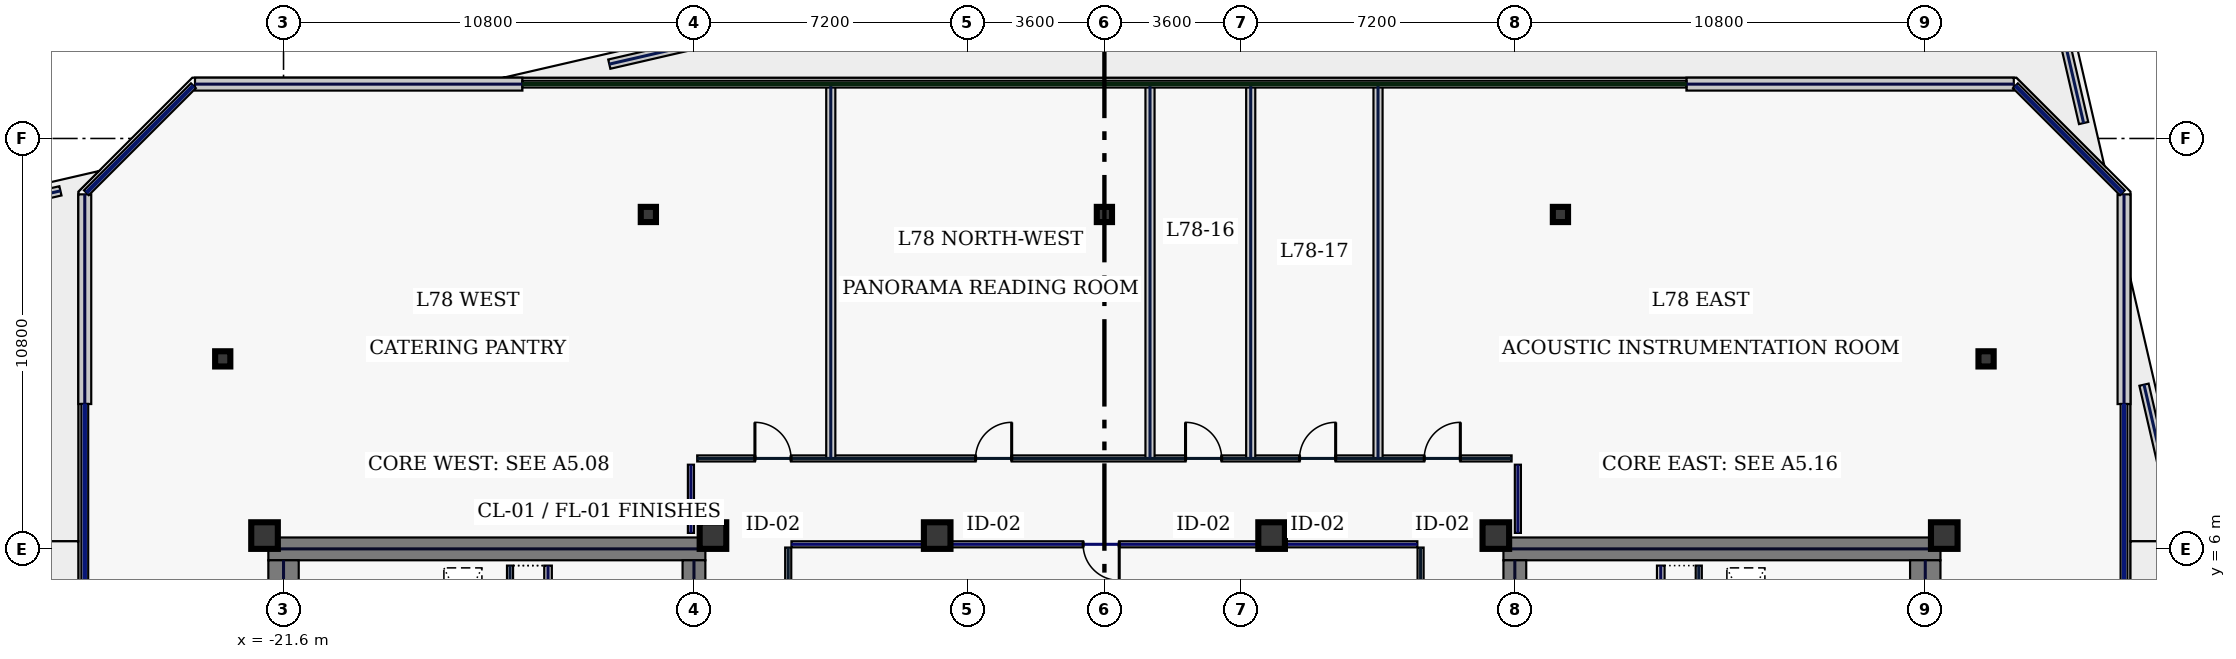
"""IFC4 building model, lengths in metres.
Left out: names, types, materials, properties, quantities, classifications, styles, units other than length and angle.
Written with IfcOpenShell. Run it as: python <this file> out.ifc"""

import sys

from ifc_helpers import new_model, si_unit, direction, frame, frame_2d, origin, origin_2d, place, context, subcontext, project, spatial, rectangle, hollow_rectangle, extrude, element, fill, save


model = new_model("IFC4")
c1 = context("Model", 3, precision=1e-05, world=origin(), true_north=direction((0.0, 1.0)))
c2 = subcontext(c1, "Body", "Model", "MODEL_VIEW")
j1 = project(units=[si_unit("LENGTHUNIT", "METRE"), si_unit("PLANEANGLEUNIT", "RADIAN")], contexts=[c1])
p1 = place(None, origin())
s1 = spatial("IfcSite", under=j1, at=p1, CompositionType="ELEMENT")
p2 = place(p1, origin())
s2 = spatial("IfcBuilding", under=s1, at=p2, CompositionType="ELEMENT")
p3 = place(p2, frame((0.0, 0.0, 333.0)))
s3 = spatial("IfcBuildingStorey", under=s2, at=p3, CompositionType="ELEMENT", Elevation=333.0)
p4 = place(p3, frame((-22.0, 6.0, 0.0), z_axis=(0.0, 0.0, 1.0), x_axis=(1.0, 0.0, 0.0)))
e1 = element("IfcWall", 1, at=p4, inside=s3, PredefinedType="SHEAR", context=c2, shape_type="SweptSolid", body=[
    extrude(rectangle(XDim=11.5, YDim=0.6, at=frame_2d((5.75, 0.0))), origin(), (0.0, 0.0, 1.0), 6.5),
])
p5 = place(p3, frame((-21.6, -5.7, 0.0), z_axis=(0.0, 0.0, 1.0), x_axis=(0.0, 1.0, 0.0)))
e2 = element("IfcWall", 2, at=p5, inside=s3, PredefinedType="SHEAR", context=c2, shape_type="SweptSolid", body=[
    extrude(rectangle(XDim=11.4, YDim=0.8, at=frame_2d((5.7, 0.0))), origin(), (0.0, 0.0, 1.0), 6.5),
])
p6 = place(p3, frame((-10.8, 0.05, 0.0), z_axis=(0.0, 0.0, 1.0), x_axis=(0.0, 1.0, 0.0)))
e3 = element("IfcWall", 3, at=p6, inside=s3, PredefinedType="SHEAR", context=c2, shape_type="SweptSolid", body=[
    extrude(rectangle(XDim=5.65, YDim=0.6, at=frame_2d((2.825, 0.0))), origin(), (0.0, 0.0, 1.0), 6.5),
])
p7 = place(p3, frame((10.5, 6.0, 0.0), z_axis=(0.0, 0.0, 1.0), x_axis=(1.0, 0.0, 0.0)))
e4 = element("IfcWall", 4, at=p7, inside=s3, PredefinedType="SHEAR", context=c2, shape_type="SweptSolid", body=[
    extrude(rectangle(XDim=11.5, YDim=0.6, at=frame_2d((5.75, 0.0))), origin(), (0.0, 0.0, 1.0), 6.5),
])
p8 = place(p3, frame((21.6, -5.7, 0.0), z_axis=(0.0, 0.0, 1.0), x_axis=(0.0, 1.0, 0.0)))
e5 = element("IfcWall", 5, at=p8, inside=s3, PredefinedType="SHEAR", context=c2, shape_type="SweptSolid", body=[
    extrude(rectangle(XDim=11.4, YDim=0.8, at=frame_2d((5.7, 0.0))), origin(), (0.0, 0.0, 1.0), 6.5),
])
p9 = place(p3, frame((10.8, 0.05, 0.0), z_axis=(0.0, 0.0, 1.0), x_axis=(0.0, 1.0, 0.0)))
e6 = element("IfcWall", 6, at=p9, inside=s3, PredefinedType="SHEAR", context=c2, shape_type="SweptSolid", body=[
    extrude(rectangle(XDim=5.65, YDim=0.6, at=frame_2d((2.825, 0.0))), origin(), (0.0, 0.0, 1.0), 6.5),
])
for number, where, z_axis, x_axis in (
    (7, (-22.1, 6.35, 0.0), (0.0, 0.0, 1.0), (1.0, 0.0, 0.0)),
    (8, (-10.3, 6.35, 0.0), (0.0, 0.0, 1.0), (1.0, 0.0, 0.0)),
    (9, (10.3, 6.35, 0.0), (0.0, 0.0, 1.0), (1.0, 0.0, 0.0)),
    (10, (22.1, 6.35, 0.0), (0.0, 0.0, 1.0), (1.0, 0.0, 0.0)),
    (11, (-4.4, 6.35, 0.0), (0.0, 0.0, 1.0), (1.0, 0.0, 0.0)),
    (12, (4.4, 6.35, 0.0), (0.0, 0.0, 1.0), (1.0, 0.0, 0.0)),
):
    element("IfcColumn", number, at=place(p3, frame(where, z_axis=z_axis, x_axis=x_axis)), inside=s3, PredefinedType="COLUMN", context=c2, shape_type="SweptSolid", body=[
        extrude(hollow_rectangle(XDim=0.7, YDim=0.7, WallThickness=0.032, at=origin_2d()), origin(), (0.0, 0.0, 1.0), 6.5),
    ])
for number, where, z_axis, x_axis in (
    (13, (23.2, 11.0, 0.0), (0.0, 0.0, 1.0), (1.0, 0.0, 0.0)),
    (14, (-23.2, 11.0, 0.0), (0.0, 0.0, 1.0), (1.0, 0.0, 0.0)),
    (15, (-12.0, 14.8, 0.0), (0.0, 0.0, 1.0), (1.0, 0.0, 0.0)),
    (16, (0.0, 14.8, 0.0), (0.0, 0.0, 1.0), (1.0, 0.0, 0.0)),
    (17, (12.0, 14.8, 0.0), (0.0, 0.0, 1.0), (1.0, 0.0, 0.0)),
):
    element("IfcColumn", number, at=place(p3, frame(where, z_axis=z_axis, x_axis=x_axis)), inside=s3, PredefinedType="COLUMN", context=c2, shape_type="SweptSolid", body=[
        extrude(hollow_rectangle(XDim=0.4, YDim=0.4, WallThickness=0.02, at=origin_2d()), origin(), (0.0, 0.0, 1.0), 6.5),
    ])
p10 = place(p3, frame((-33.872, 13.944, 0.0), z_axis=(0.0, 0.0, 1.0), x_axis=(0.974368645226, 0.224957203043, 0.0)))
e18 = element("IfcWall", 18, at=p10, inside=s3, PredefinedType="PARAPET", context=c2, shape_type="SweptSolid", body=[
    extrude(rectangle(XDim=6.57, YDim=0.25, at=frame_2d((3.285, 0.0))), origin(), (0.0, 0.0, 1.0), 1.15),
])
p11 = place(p3, frame((-13.028, 18.756, 0.0), z_axis=(0.0, 0.0, 1.0), x_axis=(0.974370527604, 0.224949049647, 0.0)))
e19 = element("IfcWall", 19, at=p11, inside=s3, PredefinedType="PARAPET", context=c2, shape_type="SweptSolid", body=[
    extrude(rectangle(XDim=32.856, YDim=0.25, at=frame_2d((16.428, 0.0))), origin(), (0.0, 0.0, 1.0), 1.15),
])
p12 = place(p3, frame((24.498, 22.703, 0.0), z_axis=(0.0, 0.0, 1.0), x_axis=(0.224960650299, -0.974367849335, 0.0)))
e20 = element("IfcWall", 20, at=p12, inside=s3, PredefinedType="PARAPET", context=c2, shape_type="SweptSolid", body=[
    extrude(rectangle(XDim=5.641, YDim=0.25, at=frame_2d((2.821, 0.0))), origin(), (0.0, 0.0, 1.0), 1.15),
])
p13 = place(p3, frame((27.356, 10.321, 0.0), z_axis=(0.0, 0.0, 1.0), x_axis=(0.224955106174, -0.974369129338, 0.0)))
e21 = element("IfcWall", 21, at=p13, inside=s3, PredefinedType="PARAPET", context=c2, shape_type="SweptSolid", body=[
    extrude(rectangle(XDim=22.941, YDim=0.25, at=frame_2d((11.47, 0.0))), origin(), (0.0, 0.0, 1.0), 1.15),
])
p14 = place(p3, frame((-26.83, 9.811, 0.0), z_axis=(0.0, 0.0, 1.0), x_axis=(0.0, 1.0, 0.0)))
e22 = element("IfcWall", 22, at=p14, inside=s3, PredefinedType="STANDARD", context=c2, shape_type="SweptSolid", body=[
    extrude(rectangle(XDim=5.518, YDim=0.34, at=frame_2d((2.759, 0.0))), origin(), (0.0, 0.0, 1.0), 6.5),
])
p15 = place(p3, frame((-23.93, 18.23, 0.0), z_axis=(0.0, 0.0, 1.0), x_axis=(1.0, 0.0, 0.0)))
e23 = element("IfcWall", 23, at=p15, inside=s3, PredefinedType="STANDARD", context=c2, shape_type="SweptSolid", body=[
    extrude(rectangle(XDim=8.615, YDim=0.34, at=frame_2d((4.308, 0.0))), origin(), (0.0, 0.0, 1.0), 6.5),
])
p16 = place(p3, frame((15.315, 18.23, 0.0), z_axis=(0.0, 0.0, 1.0), x_axis=(1.0, 0.0, 0.0)))
e24 = element("IfcWall", 24, at=p16, inside=s3, PredefinedType="STANDARD", context=c2, shape_type="SweptSolid", body=[
    extrude(rectangle(XDim=8.614, YDim=0.34, at=frame_2d((4.307, 0.0))), origin(), (0.0, 0.0, 1.0), 6.5),
])
p17 = place(p3, frame((26.83, 15.33, 0.0), z_axis=(0.0, 0.0, 1.0), x_axis=(0.0, -1.0, 0.0)))
e25 = element("IfcWall", 25, at=p17, inside=s3, PredefinedType="STANDARD", context=c2, shape_type="SweptSolid", body=[
    extrude(rectangle(XDim=5.519, YDim=0.34, at=frame_2d((2.76, 0.0))), origin(), (0.0, 0.0, 1.0), 6.5),
])
p18 = place(p3, frame((-15.64, 3.405, 0.0), z_axis=(0.0, 0.0, 1.0), x_axis=(0.0, 1.0, 0.0)))
e26 = element("IfcWall", 26, at=p18, inside=s3, PredefinedType="PARTITIONING", context=c2, shape_type="SweptSolid", body=[
    extrude(rectangle(XDim=2.155, YDim=0.16, at=frame_2d((1.078, 0.0))), origin(), (0.0, 0.0, 1.0), 6.5),
])
p19 = place(p18, frame((0.35, 0.0, 0.0)))
e27 = element("IfcOpeningElement", 27, at=p19, cuts=e26, PredefinedType="OPENING", context=c2, shape_type="SweptSolid", body=[
    extrude(rectangle(XDim=0.9, YDim=2.2, at=frame_2d((0.45, 1.1))), frame((0.0, 0.09, 0.0), z_axis=(0.0, -1.0, 0.0), x_axis=(1.0, 0.0, 0.0)), (0.0, 0.0, 1.0), 0.18),
])
p20 = place(p3, frame((-14.64, 2.96, 0.0), z_axis=(0.0, 0.0, 1.0), x_axis=(0.0, 1.0, 0.0)))
e28 = element("IfcWall", 28, at=p20, inside=s3, PredefinedType="SOLIDWALL", context=c2, shape_type="SweptSolid", body=[
    extrude(rectangle(XDim=2.6, YDim=0.2, at=frame_2d((1.3, 0.0))), origin(), (0.0, 0.0, 1.0), 6.5),
])
p21 = place(p20, frame((0.52, 0.0, 0.0)))
e29 = element("IfcOpeningElement", 29, at=p21, cuts=e28, PredefinedType="OPENING", context=c2, shape_type="SweptSolid", body=[
    extrude(rectangle(XDim=0.95, YDim=2.2, at=frame_2d((0.475, 1.1))), frame((0.0, 0.11, 0.0), z_axis=(0.0, -1.0, 0.0), x_axis=(1.0, 0.0, 0.0)), (0.0, 0.0, 1.0), 0.22),
])
p22 = place(p3, frame((15.64, 3.405, 0.0), z_axis=(0.0, 0.0, 1.0), x_axis=(0.0, 1.0, 0.0)))
e30 = element("IfcWall", 30, at=p22, inside=s3, PredefinedType="PARTITIONING", context=c2, shape_type="SweptSolid", body=[
    extrude(rectangle(XDim=2.155, YDim=0.16, at=frame_2d((1.078, 0.0))), origin(), (0.0, 0.0, 1.0), 6.5),
])
p23 = place(p22, frame((0.35, 0.0, 0.0)))
e31 = element("IfcOpeningElement", 31, at=p23, cuts=e30, PredefinedType="OPENING", context=c2, shape_type="SweptSolid", body=[
    extrude(rectangle(XDim=0.9, YDim=2.2, at=frame_2d((0.45, 1.1))), frame((0.0, 0.09, 0.0), z_axis=(0.0, -1.0, 0.0), x_axis=(1.0, 0.0, 0.0)), (0.0, 0.0, 1.0), 0.18),
])
p24 = place(p3, frame((14.64, 2.96, 0.0), z_axis=(0.0, 0.0, 1.0), x_axis=(0.0, 1.0, 0.0)))
e32 = element("IfcWall", 32, at=p24, inside=s3, PredefinedType="SOLIDWALL", context=c2, shape_type="SweptSolid", body=[
    extrude(rectangle(XDim=2.6, YDim=0.2, at=frame_2d((1.3, 0.0))), origin(), (0.0, 0.0, 1.0), 6.5),
])
p25 = place(p24, frame((0.52, 0.0, 0.0)))
e33 = element("IfcOpeningElement", 33, at=p25, cuts=e32, PredefinedType="OPENING", context=c2, shape_type="SweptSolid", body=[
    extrude(rectangle(XDim=0.95, YDim=2.2, at=frame_2d((0.475, 1.1))), frame((0.0, 0.11, 0.0), z_axis=(0.0, -1.0, 0.0), x_axis=(1.0, 0.0, 0.0)), (0.0, 0.0, 1.0), 0.22),
])
p26 = place(p3, frame((-10.88, 6.42, 0.0), z_axis=(0.0, 0.0, 1.0), x_axis=(0.0, 1.0, 0.0)))
e34 = element("IfcWall", 34, at=p26, inside=s3, PredefinedType="PARTITIONING", context=c2, shape_type="SweptSolid", body=[
    extrude(rectangle(XDim=1.795, YDim=0.16, at=frame_2d((0.897, 0.0))), origin(), (0.0, 0.0, 1.0), 4.895),
])
p27 = place(p3, frame((-10.715, 8.38, 0.0), z_axis=(0.0, 0.0, 1.0), x_axis=(1.0, 0.0, 0.0)))
e35 = element("IfcWall", 35, at=p27, inside=s3, PredefinedType="PARTITIONING", context=c2, shape_type="SweptSolid", body=[
    extrude(rectangle(XDim=21.43, YDim=0.16, at=frame_2d((10.715, 0.0))), origin(), (0.0, 0.0, 1.0), 6.5),
])
p28 = place(p27, frame((7.325, 0.0, 0.0)))
e36 = element("IfcOpeningElement", 36, at=p28, cuts=e35, PredefinedType="OPENING", context=c2, shape_type="SweptSolid", body=[
    extrude(rectangle(XDim=0.95, YDim=2.2, at=frame_2d((0.475, 1.1))), frame((0.0, 0.09, 0.0), z_axis=(0.0, -1.0, 0.0), x_axis=(1.0, 0.0, 0.0)), (0.0, 0.0, 1.0), 0.18),
])
p29 = place(p27, frame((12.85, 0.0, 0.0)))
e37 = element("IfcOpeningElement", 37, at=p29, cuts=e35, PredefinedType="OPENING", context=c2, shape_type="SweptSolid", body=[
    extrude(rectangle(XDim=0.95, YDim=2.2, at=frame_2d((0.475, 1.1))), frame((0.0, 0.09, 0.0), z_axis=(0.0, -1.0, 0.0), x_axis=(1.0, 0.0, 0.0)), (0.0, 0.0, 1.0), 0.18),
])
p30 = place(p27, frame((15.85, 0.0, 0.0)))
e38 = element("IfcOpeningElement", 38, at=p30, cuts=e35, PredefinedType="OPENING", context=c2, shape_type="SweptSolid", body=[
    extrude(rectangle(XDim=0.95, YDim=2.2, at=frame_2d((0.475, 1.1))), frame((0.0, 0.09, 0.0), z_axis=(0.0, -1.0, 0.0), x_axis=(1.0, 0.0, 0.0)), (0.0, 0.0, 1.0), 0.18),
])
p31 = place(p27, frame((1.519, 0.0, 0.0)))
e39 = element("IfcOpeningElement", 39, at=p31, cuts=e35, PredefinedType="OPENING", context=c2, shape_type="SweptSolid", body=[
    extrude(rectangle(XDim=0.95, YDim=2.2, at=frame_2d((0.475, 1.1))), frame((0.0, 0.09, 0.0), z_axis=(0.0, -1.0, 0.0), x_axis=(1.0, 0.0, 0.0)), (0.0, 0.0, 1.0), 0.18),
])
p32 = place(p27, frame((19.131, 0.0, 0.0)))
e40 = element("IfcOpeningElement", 40, at=p32, cuts=e35, PredefinedType="OPENING", context=c2, shape_type="SweptSolid", body=[
    extrude(rectangle(XDim=0.95, YDim=2.2, at=frame_2d((0.475, 1.1))), frame((0.0, 0.09, 0.0), z_axis=(0.0, -1.0, 0.0), x_axis=(1.0, 0.0, 0.0)), (0.0, 0.0, 1.0), 0.18),
])
p33 = place(p3, frame((10.88, 8.215, 0.0), z_axis=(0.0, 0.0, 1.0), x_axis=(0.0, -1.0, 0.0)))
e41 = element("IfcWall", 41, at=p33, inside=s3, PredefinedType="PARTITIONING", context=c2, shape_type="SweptSolid", body=[
    extrude(rectangle(XDim=1.795, YDim=0.16, at=frame_2d((0.897, 0.0))), origin(), (0.0, 0.0, 1.0), 4.895),
])
p34 = place(p3, frame((8.32, -6.035, 0.0), z_axis=(0.0, 0.0, 1.0), x_axis=(0.0, 1.0, 0.0)))
e42 = element("IfcWall", 42, at=p34, inside=s3, PredefinedType="PARTITIONING", context=c2, shape_type="SweptSolid", body=[
    extrude(rectangle(XDim=12.07, YDim=0.16, at=frame_2d((6.035, 0.0))), origin(), (0.0, 0.0, 1.0), 6.5),
])
p35 = place(p3, frame((8.235, 6.12, 0.0), z_axis=(0.0, 0.0, 1.0), x_axis=(-1.0, 0.0, 0.0)))
e43 = element("IfcWall", 43, at=p35, inside=s3, PredefinedType="PARTITIONING", context=c2, shape_type="SweptSolid", body=[
    extrude(rectangle(XDim=16.47, YDim=0.16, at=frame_2d((8.235, 0.0))), origin(), (0.0, 0.0, 1.0), 5.795),
])
p36 = place(p35, frame((7.845, 0.0, 0.0)))
e44 = element("IfcOpeningElement", 44, at=p36, cuts=e43, PredefinedType="OPENING", context=c2, shape_type="SweptSolid", body=[
    extrude(rectangle(XDim=0.95, YDim=2.2, at=frame_2d((0.475, 1.1))), frame((0.0, 0.09, 0.0), z_axis=(0.0, -1.0, 0.0), x_axis=(1.0, 0.0, 0.0)), (0.0, 0.0, 1.0), 0.18),
])
p37 = place(p3, frame((-8.32, 6.035, 0.0), z_axis=(0.0, 0.0, 1.0), x_axis=(0.0, -1.0, 0.0)))
e45 = element("IfcWall", 45, at=p37, inside=s3, PredefinedType="PARTITIONING", context=c2, shape_type="SweptSolid", body=[
    extrude(rectangle(XDim=12.07, YDim=0.16, at=frame_2d((6.035, 0.0))), origin(), (0.0, 0.0, 1.0), 6.5),
])
for number, where, z_axis, x_axis in (
    (46, (-7.2, 8.385, 0.0), (0.0, 0.0, 1.0), (0.0, 1.0, 0.0)),
    (47, (7.2, 8.385, 0.0), (0.0, 0.0, 1.0), (0.0, 1.0, 0.0)),
    (48, (1.2, 8.385, 0.0), (0.0, 0.0, 1.0), (0.0, 1.0, 0.0)),
    (49, (3.85, 8.385, 0.0), (0.0, 0.0, 1.0), (0.0, 1.0, 0.0)),
):
    element("IfcWall", number, at=place(p3, frame(where, z_axis=z_axis, x_axis=x_axis)), inside=s3, PredefinedType="PARTITIONING", context=c2, shape_type="SweptSolid", body=[
        extrude(rectangle(XDim=9.855, YDim=0.24, at=frame_2d((4.927, 0.0))), origin(), (0.0, 0.0, 1.0), 6.5),
    ])
p38 = place(p36, origin())
e50 = element("IfcDoor", 50, at=p38, inside=s3, OperationType="SINGLE_SWING_LEFT", PredefinedType="DOOR", context=c2, shape_type="SweptSolid", body=[
    extrude(rectangle(XDim=0.95, YDim=2.2, at=frame_2d((0.475, 1.1))), frame((0.0, 0.025, 0.0), z_axis=(0.0, -1.0, 0.0), x_axis=(1.0, 0.0, 0.0)), (0.0, 0.0, 1.0), 0.05),
])
fill(e44, e50)
p39 = place(p28, origin())
e51 = element("IfcDoor", 51, at=p39, inside=s3, OperationType="SINGLE_SWING_RIGHT", PredefinedType="DOOR", context=c2, shape_type="SweptSolid", body=[
    extrude(rectangle(XDim=0.95, YDim=2.2, at=frame_2d((0.475, 1.1))), frame((0.0, 0.025, 0.0), z_axis=(0.0, -1.0, 0.0), x_axis=(1.0, 0.0, 0.0)), (0.0, 0.0, 1.0), 0.05),
])
fill(e36, e51)
p40 = place(p29, origin())
e52 = element("IfcDoor", 52, at=p40, inside=s3, OperationType="SINGLE_SWING_LEFT", PredefinedType="DOOR", context=c2, shape_type="SweptSolid", body=[
    extrude(rectangle(XDim=0.95, YDim=2.2, at=frame_2d((0.475, 1.1))), frame((0.0, 0.025, 0.0), z_axis=(0.0, -1.0, 0.0), x_axis=(1.0, 0.0, 0.0)), (0.0, 0.0, 1.0), 0.05),
])
fill(e37, e52)
p41 = place(p30, origin())
e53 = element("IfcDoor", 53, at=p41, inside=s3, OperationType="SINGLE_SWING_RIGHT", PredefinedType="DOOR", context=c2, shape_type="SweptSolid", body=[
    extrude(rectangle(XDim=0.95, YDim=2.2, at=frame_2d((0.475, 1.1))), frame((0.0, 0.025, 0.0), z_axis=(0.0, -1.0, 0.0), x_axis=(1.0, 0.0, 0.0)), (0.0, 0.0, 1.0), 0.05),
])
fill(e38, e53)
p42 = place(p31, origin())
e54 = element("IfcDoor", 54, at=p42, inside=s3, OperationType="SINGLE_SWING_LEFT", PredefinedType="DOOR", context=c2, shape_type="SweptSolid", body=[
    extrude(rectangle(XDim=0.95, YDim=2.2, at=frame_2d((0.475, 1.1))), frame((0.0, 0.025, 0.0), z_axis=(0.0, -1.0, 0.0), x_axis=(1.0, 0.0, 0.0)), (0.0, 0.0, 1.0), 0.05),
])
fill(e39, e54)
p43 = place(p32, origin())
e55 = element("IfcDoor", 55, at=p43, inside=s3, OperationType="SINGLE_SWING_RIGHT", PredefinedType="DOOR", context=c2, shape_type="SweptSolid", body=[
    extrude(rectangle(XDim=0.95, YDim=2.2, at=frame_2d((0.475, 1.1))), frame((0.0, 0.025, 0.0), z_axis=(0.0, -1.0, 0.0), x_axis=(1.0, 0.0, 0.0)), (0.0, 0.0, 1.0), 0.05),
])
fill(e40, e55)
save(model, sys.argv[1])
